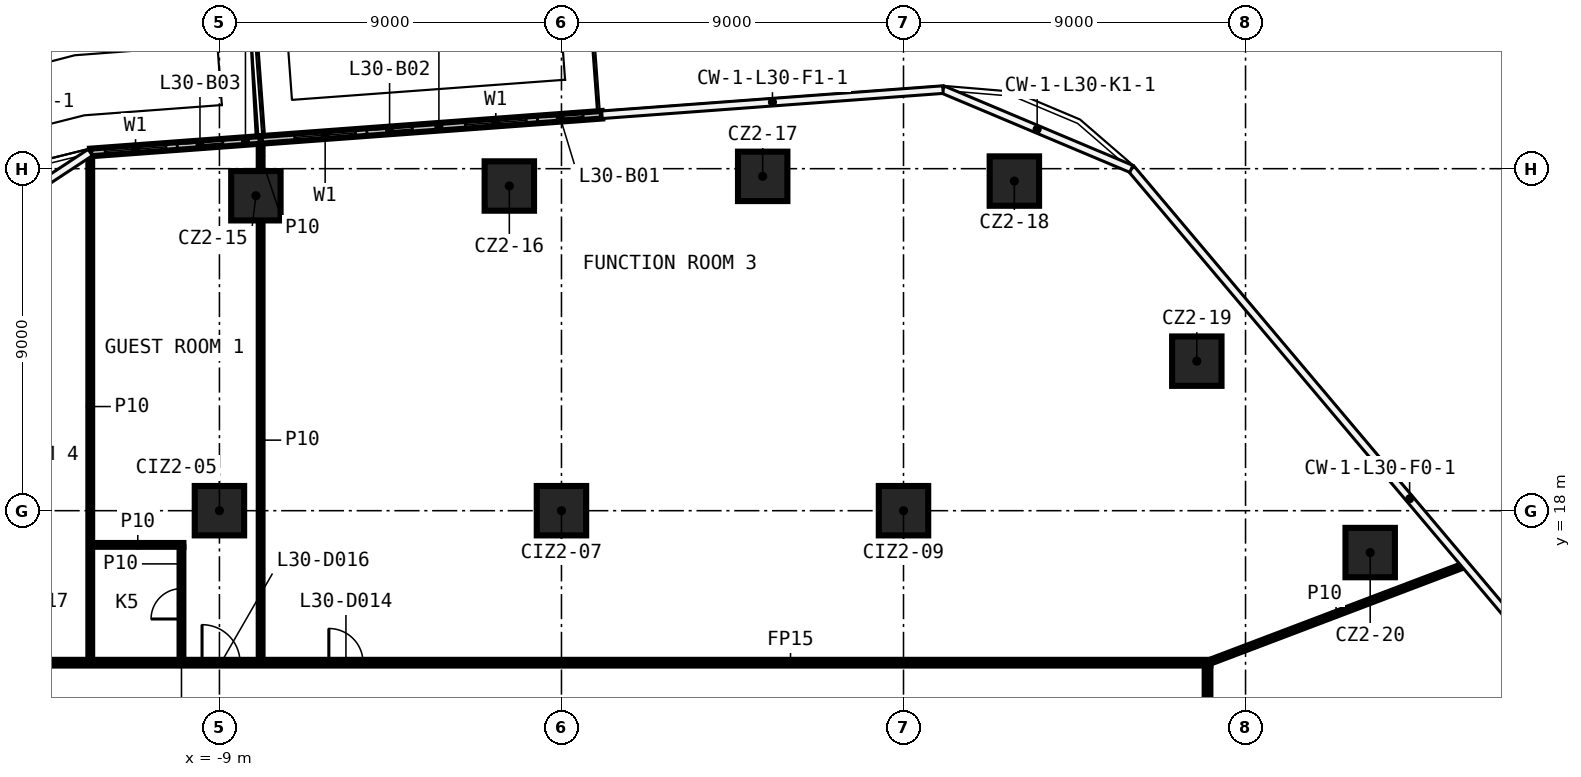
"""IFC4 building model, lengths in metres.
Left out: names, types, materials, properties, quantities, classifications, styles, units other than length and angle.
Written with IfcOpenShell. Run it as: python <this file> out.ifc"""

import sys

from ifc_helpers import new_model, si_unit, direction, frame, frame_2d, origin, origin_2d, place, context, subcontext, project, spatial, rectangle, extrude, element, fill, save


model = new_model("IFC4")
c1 = context("Model", 3, precision=1e-05, world=origin(), true_north=direction((0.0, 1.0)))
c2 = subcontext(c1, "Body", "Model", "MODEL_VIEW")
j1 = project(units=[si_unit("LENGTHUNIT", "METRE"), si_unit("PLANEANGLEUNIT", "RADIAN")], contexts=[c1])
p1 = place(None, origin())
s1 = spatial("IfcSite", under=j1, at=p1, CompositionType="ELEMENT")
p2 = place(p1, origin())
s2 = spatial("IfcBuilding", under=s1, at=p2, CompositionType="ELEMENT")
p3 = place(p2, frame((0.0, 0.0, 135.9)))
s3 = spatial("IfcBuildingStorey", under=s2, at=p3, CompositionType="ELEMENT", Elevation=135.9)
for number, where, z_axis, x_axis in (
    (1, (-8.041, 26.288, 0.0), (0.0, 0.0, 1.0), (1.0, 0.0, 0.0)),
    (2, (-1.372, 26.544, 0.0), (0.0, 0.0, 1.0), (1.0, 0.0, 0.0)),
    (3, (5.295, 26.798, 0.0), (0.0, 0.0, 1.0), (1.0, 0.0, 0.0)),
    (4, (11.917, 26.674, 0.0), (0.0, 0.0, 1.0), (1.0, 0.0, 0.0)),
    (5, (16.718, 21.935, 0.0), (0.0, 0.0, 1.0), (1.0, 0.0, 0.0)),
    (6, (21.28, 16.898, 0.0), (0.0, 0.0, 1.0), (1.0, 0.0, 0.0)),
    (7, (-9.0, 18.0, 0.0), (0.0, 0.0, 1.0), (1.0, 0.0, 0.0)),
    (8, (0.0, 18.0, 0.0), (0.0, 0.0, 1.0), (1.0, 0.0, 0.0)),
    (9, (9.0, 18.0, 0.0), (0.0, 0.0, 1.0), (1.0, 0.0, 0.0)),
):
    element("IfcColumn", number, at=place(p3, frame(where, z_axis=z_axis, x_axis=x_axis)), inside=s3, PredefinedType="COLUMN", context=c2, shape_type="SweptSolid", body=[
        extrude(rectangle(XDim=1.3, YDim=1.3, at=origin_2d()), origin(), (0.0, 0.0, 1.0), 3.3),
    ])
p4 = place(p3, frame((-17.075, 14.0, 0.0), z_axis=(0.0, 0.0, 1.0), x_axis=(1.0, 0.0, 0.0)))
e10 = element("IfcWall", 10, at=p4, inside=s3, PredefinedType="PARTITIONING", context=c2, shape_type="SweptSolid", body=[
    extrude(rectangle(XDim=34.15, YDim=0.15, at=frame_2d((17.075, 0.0))), origin(), (0.0, 0.0, 1.0), 3.3),
])
p5 = place(p4, frame((10.954, 0.0, 0.0)))
e11 = element("IfcOpeningElement", 11, at=p5, cuts=e10, PredefinedType="OPENING", context=c2, shape_type="SweptSolid", body=[
    extrude(rectangle(XDim=0.9, YDim=2.1, at=frame_2d((0.45, 1.05))), frame((0.0, 0.085, 0.0), z_axis=(0.0, -1.0, 0.0), x_axis=(1.0, 0.0, 0.0)), (0.0, 0.0, 1.0), 0.17),
])
p6 = place(p4, frame((7.617, 0.0, 0.0)))
e12 = element("IfcOpeningElement", 12, at=p6, cuts=e10, PredefinedType="OPENING", context=c2, shape_type="SweptSolid", body=[
    extrude(rectangle(XDim=1.0, YDim=2.1, at=frame_2d((0.5, 1.05))), frame((0.0, 0.085, 0.0), z_axis=(0.0, -1.0, 0.0), x_axis=(1.0, 0.0, 0.0)), (0.0, 0.0, 1.0), 0.17),
])
p7 = place(p4, frame((2.425, 0.0, 0.0)))
e13 = element("IfcOpeningElement", 13, at=p7, cuts=e10, PredefinedType="OPENING", context=c2, shape_type="SweptSolid", body=[
    extrude(rectangle(XDim=0.9, YDim=2.1, at=frame_2d((0.45, 1.05))), frame((0.0, 0.085, 0.0), z_axis=(0.0, -1.0, 0.0), x_axis=(1.0, 0.0, 0.0)), (0.0, 0.0, 1.0), 0.17),
])
p8 = place(p3, frame((-12.349, 17.1, 0.0), z_axis=(0.0, 0.0, 1.0), x_axis=(1.0, 0.0, 0.0)))
e14 = element("IfcWall", 14, at=p8, inside=s3, PredefinedType="PARTITIONING", context=c2, shape_type="SweptSolid", body=[
    extrude(rectangle(XDim=2.4, YDim=0.1, at=frame_2d((1.2, 0.0))), origin(), (0.0, 0.0, 1.0), 3.3),
])
p9 = place(p3, frame((17.0, 14.0, 0.0), z_axis=(0.0, 0.0, 1.0), x_axis=(0.934953139897, 0.354771230791, 0.0)))
e15 = element("IfcWall", 15, at=p9, inside=s3, PredefinedType="PARTITIONING", context=c2, shape_type="SweptSolid", body=[
    extrude(rectangle(XDim=7.234, YDim=0.1, at=frame_2d((3.617, 0.0))), origin(), (0.0, 0.0, 1.0), 3.3),
])
p10 = place(p3, frame((17.0, 13.925, 0.0), z_axis=(0.0, 0.0, 1.0), x_axis=(0.0, -1.0, 0.0)))
e16 = element("IfcWall", 16, at=p10, inside=s3, PredefinedType="PARTITIONING", context=c2, shape_type="SweptSolid", body=[
    extrude(rectangle(XDim=27.85, YDim=0.15, at=frame_2d((13.925, 0.0))), origin(), (0.0, 0.0, 1.0), 3.3),
])
p11 = place(p10, frame((24.983, 0.0, 0.0)))
e17 = element("IfcOpeningElement", 17, at=p11, cuts=e16, PredefinedType="OPENING", context=c2, shape_type="SweptSolid", body=[
    extrude(rectangle(XDim=0.9, YDim=2.1, at=frame_2d((0.45, 1.05))), frame((0.0, 0.085, 0.0), z_axis=(0.0, -1.0, 0.0), x_axis=(1.0, 0.0, 0.0)), (0.0, 0.0, 1.0), 0.17),
])
p12 = place(p10, frame((20.143, 0.0, 0.0)))
e18 = element("IfcOpeningElement", 18, at=p12, cuts=e16, PredefinedType="OPENING", context=c2, shape_type="SweptSolid", body=[
    extrude(rectangle(XDim=0.9, YDim=2.1, at=frame_2d((0.45, 1.05))), frame((0.0, 0.085, 0.0), z_axis=(0.0, -1.0, 0.0), x_axis=(1.0, 0.0, 0.0)), (0.0, 0.0, 1.0), 0.17),
])
p13 = place(p10, frame((11.054, 0.0, 0.0)))
e19 = element("IfcOpeningElement", 19, at=p13, cuts=e16, PredefinedType="OPENING", context=c2, shape_type="SweptSolid", body=[
    extrude(rectangle(XDim=1.0, YDim=2.1, at=frame_2d((0.5, 1.05))), frame((0.0, 0.085, 0.0), z_axis=(0.0, -1.0, 0.0), x_axis=(1.0, 0.0, 0.0)), (0.0, 0.0, 1.0), 0.17),
])
p14 = place(p10, frame((7.139, 0.0, 0.0)))
e20 = element("IfcOpeningElement", 20, at=p14, cuts=e16, PredefinedType="OPENING", context=c2, shape_type="SweptSolid", body=[
    extrude(rectangle(XDim=0.9, YDim=2.1, at=frame_2d((0.45, 1.05))), frame((0.0, 0.085, 0.0), z_axis=(0.0, -1.0, 0.0), x_axis=(1.0, 0.0, 0.0)), (0.0, 0.0, 1.0), 0.17),
])
p15 = place(p3, frame((-7.916, 14.075, 0.0), z_axis=(0.0, 0.0, 1.0), x_axis=(0.0, 1.0, 0.0)))
e21 = element("IfcWall", 21, at=p15, inside=s3, PredefinedType="PARTITIONING", context=c2, shape_type="SweptSolid", body=[
    extrude(rectangle(XDim=11.563, YDim=0.1, at=frame_2d((5.781, 0.0))), origin(), (0.0, 0.0, 1.0), 3.3),
])
p16 = place(p3, frame((-7.916, 26.938, 0.0), z_axis=(0.0, 0.0, 1.0), x_axis=(0.0, 1.0, 0.0)))
e22 = element("IfcWall", 22, at=p16, inside=s3, PredefinedType="PARTITIONING", context=c2, shape_type="SweptSolid", body=[
    extrude(rectangle(XDim=0.799, YDim=0.1, at=frame_2d((0.399, 0.0))), origin(), (0.0, 0.0, 1.0), 3.3),
])
p17 = place(p3, frame((-9.999, 14.075, 0.0), z_axis=(0.0, 0.0, 1.0), x_axis=(0.0, 1.0, 0.0)))
e23 = element("IfcWall", 23, at=p17, inside=s3, PredefinedType="PARTITIONING", context=c2, shape_type="SweptSolid", body=[
    extrude(rectangle(XDim=2.975, YDim=0.1, at=frame_2d((1.488, 0.0))), origin(), (0.0, 0.0, 1.0), 3.3),
])
p18 = place(p17, frame((1.075, 0.0, 0.0)))
e24 = element("IfcOpeningElement", 24, at=p18, cuts=e23, PredefinedType="OPENING", context=c2, shape_type="SweptSolid", body=[
    extrude(rectangle(XDim=0.8, YDim=2.1, at=frame_2d((0.4, 1.05))), frame((0.0, 0.06, 0.0), z_axis=(0.0, -1.0, 0.0), x_axis=(1.0, 0.0, 0.0)), (0.0, 0.0, 1.0), 0.12),
])
p19 = place(p3, frame((-12.399, 14.075, 0.0), z_axis=(0.0, 0.0, 1.0), x_axis=(0.0, 1.0, 0.0)))
e25 = element("IfcWall", 25, at=p19, inside=s3, PredefinedType="PARTITIONING", context=c2, shape_type="SweptSolid", body=[
    extrude(rectangle(XDim=13.331, YDim=0.1, at=frame_2d((6.666, 0.0))), origin(), (0.0, 0.0, 1.0), 3.3),
])
p20 = place(p3, frame((1.065, 28.419, 0.0), z_axis=(0.0, 0.0, 1.0), x_axis=(-0.997293582655, -0.07352217349, 0.0)))
e26 = element("IfcWall", 26, at=p20, inside=s3, PredefinedType="SOLIDWALL", context=c2, shape_type="SweptSolid", body=[
    extrude(rectangle(XDim=9.006, YDim=0.2, at=frame_2d((4.503, 0.0))), origin(), (0.0, 0.0, 1.0), 3.3),
])
p21 = place(p20, frame((2.0, 0.0, 0.6)))
e27 = element("IfcOpeningElement", 27, at=p21, cuts=e26, PredefinedType="OPENING", context=c2, shape_type="SweptSolid", body=[
    extrude(rectangle(XDim=1.6, YDim=2.4, at=frame_2d((0.8, 1.2))), frame((0.0, 0.11, 0.0), z_axis=(0.0, -1.0, 0.0), x_axis=(1.0, 0.0, 0.0)), (0.0, 0.0, 1.0), 0.22),
])
p22 = place(p20, frame((0.5, 0.0, 0.0)))
e28 = element("IfcOpeningElement", 28, at=p22, cuts=e26, PredefinedType="OPENING", context=c2, shape_type="SweptSolid", body=[
    extrude(rectangle(XDim=1.2, YDim=2.4, at=frame_2d((0.6, 1.2))), frame((0.0, 0.11, 0.0), z_axis=(0.0, -1.0, 0.0), x_axis=(1.0, 0.0, 0.0)), (0.0, 0.0, 1.0), 0.22),
])
p23 = place(p20, frame((6.503, 0.0, 0.6)))
e29 = element("IfcOpeningElement", 29, at=p23, cuts=e26, PredefinedType="OPENING", context=c2, shape_type="SweptSolid", body=[
    extrude(rectangle(XDim=1.6, YDim=2.4, at=frame_2d((0.8, 1.2))), frame((0.0, 0.11, 0.0), z_axis=(0.0, -1.0, 0.0), x_axis=(1.0, 0.0, 0.0)), (0.0, 0.0, 1.0), 0.22),
])
p24 = place(p20, frame((5.003, 0.0, 0.0)))
e30 = element("IfcOpeningElement", 30, at=p24, cuts=e26, PredefinedType="OPENING", context=c2, shape_type="SweptSolid", body=[
    extrude(rectangle(XDim=1.2, YDim=2.4, at=frame_2d((0.6, 1.2))), frame((0.0, 0.11, 0.0), z_axis=(0.0, -1.0, 0.0), x_axis=(1.0, 0.0, 0.0)), (0.0, 0.0, 1.0), 0.22),
])
p25 = place(p3, frame((-7.917, 27.757, 0.0), z_axis=(0.0, 0.0, 1.0), x_axis=(-0.997291417846, -0.073551532206, 0.0)))
e31 = element("IfcWall", 31, at=p25, inside=s3, PredefinedType="SOLIDWALL", context=c2, shape_type="SweptSolid", body=[
    extrude(rectangle(XDim=4.494, YDim=0.2, at=frame_2d((2.247, 0.0))), origin(), (0.0, 0.0, 1.0), 3.3),
])
p26 = place(p25, frame((2.5, 0.0, 0.6)))
e32 = element("IfcOpeningElement", 32, at=p26, cuts=e31, PredefinedType="OPENING", context=c2, shape_type="SweptSolid", body=[
    extrude(rectangle(XDim=1.6, YDim=2.4, at=frame_2d((0.8, 1.2))), frame((0.0, 0.11, 0.0), z_axis=(0.0, -1.0, 0.0), x_axis=(1.0, 0.0, 0.0)), (0.0, 0.0, 1.0), 0.22),
])
p27 = place(p25, frame((1.0, 0.0, 0.0)))
e33 = element("IfcOpeningElement", 33, at=p27, cuts=e31, PredefinedType="OPENING", context=c2, shape_type="SweptSolid", body=[
    extrude(rectangle(XDim=1.2, YDim=2.4, at=frame_2d((0.6, 1.2))), frame((0.0, 0.11, 0.0), z_axis=(0.0, -1.0, 0.0), x_axis=(1.0, 0.0, 0.0)), (0.0, 0.0, 1.0), 0.22),
])
p28 = place(p5, origin())
e34 = element("IfcDoor", 34, at=p28, inside=s3, OperationType="SINGLE_SWING_RIGHT", PredefinedType="DOOR", context=c2, shape_type="SweptSolid", body=[
    extrude(rectangle(XDim=0.9, YDim=2.1, at=frame_2d((0.45, 1.05))), frame((0.0, 0.025, 0.0), z_axis=(0.0, -1.0, 0.0), x_axis=(1.0, 0.0, 0.0)), (0.0, 0.0, 1.0), 0.05),
])
fill(e11, e34)
p29 = place(p18, origin())
e35 = element("IfcDoor", 35, at=p29, inside=s3, OperationType="SINGLE_SWING_RIGHT", PredefinedType="DOOR", context=c2, shape_type="SweptSolid", body=[
    extrude(rectangle(XDim=0.8, YDim=2.1, at=frame_2d((0.4, 1.05))), frame((0.0, 0.025, 0.0), z_axis=(0.0, -1.0, 0.0), x_axis=(1.0, 0.0, 0.0)), (0.0, 0.0, 1.0), 0.05),
])
fill(e24, e35)
p30 = place(p6, origin())
e36 = element("IfcDoor", 36, at=p30, inside=s3, OperationType="SINGLE_SWING_LEFT", PredefinedType="DOOR", context=c2, shape_type="SweptSolid", body=[
    extrude(rectangle(XDim=1.0, YDim=2.1, at=frame_2d((0.5, 1.05))), frame((0.0, 0.025, 0.0), z_axis=(0.0, -1.0, 0.0), x_axis=(1.0, 0.0, 0.0)), (0.0, 0.0, 1.0), 0.05),
])
fill(e12, e36)
p31 = place(p21, origin())
e37 = element("IfcWindow", 37, at=p31, inside=s3, PartitioningType="SINGLE_PANEL", PredefinedType="WINDOW", context=c2, shape_type="SweptSolid", body=[
    extrude(rectangle(XDim=1.6, YDim=2.4, at=frame_2d((0.8, 1.2))), frame((0.0, 0.03, 0.0), z_axis=(0.0, -1.0, 0.0), x_axis=(1.0, 0.0, 0.0)), (0.0, 0.0, 1.0), 0.06),
])
fill(e27, e37)
p32 = place(p22, origin())
e38 = element("IfcDoor", 38, at=p32, inside=s3, OperationType="SLIDING_TO_LEFT", PredefinedType="DOOR", context=c2, shape_type="SweptSolid", body=[
    extrude(rectangle(XDim=1.2, YDim=2.4, at=frame_2d((0.6, 1.2))), frame((0.0, 0.025, 0.0), z_axis=(0.0, -1.0, 0.0), x_axis=(1.0, 0.0, 0.0)), (0.0, 0.0, 1.0), 0.05),
])
fill(e28, e38)
p33 = place(p23, origin())
e39 = element("IfcWindow", 39, at=p33, inside=s3, PartitioningType="SINGLE_PANEL", PredefinedType="WINDOW", context=c2, shape_type="SweptSolid", body=[
    extrude(rectangle(XDim=1.6, YDim=2.4, at=frame_2d((0.8, 1.2))), frame((0.0, 0.03, 0.0), z_axis=(0.0, -1.0, 0.0), x_axis=(1.0, 0.0, 0.0)), (0.0, 0.0, 1.0), 0.06),
])
fill(e29, e39)
p34 = place(p24, origin())
e40 = element("IfcDoor", 40, at=p34, inside=s3, OperationType="SLIDING_TO_LEFT", PredefinedType="DOOR", context=c2, shape_type="SweptSolid", body=[
    extrude(rectangle(XDim=1.2, YDim=2.4, at=frame_2d((0.6, 1.2))), frame((0.0, 0.025, 0.0), z_axis=(0.0, -1.0, 0.0), x_axis=(1.0, 0.0, 0.0)), (0.0, 0.0, 1.0), 0.05),
])
fill(e30, e40)
p35 = place(p26, origin())
e41 = element("IfcWindow", 41, at=p35, inside=s3, PartitioningType="SINGLE_PANEL", PredefinedType="WINDOW", context=c2, shape_type="SweptSolid", body=[
    extrude(rectangle(XDim=1.6, YDim=2.4, at=frame_2d((0.8, 1.2))), frame((0.0, 0.03, 0.0), z_axis=(0.0, -1.0, 0.0), x_axis=(1.0, 0.0, 0.0)), (0.0, 0.0, 1.0), 0.06),
])
fill(e32, e41)
p36 = place(p27, origin())
e42 = element("IfcDoor", 42, at=p36, inside=s3, OperationType="SLIDING_TO_LEFT", PredefinedType="DOOR", context=c2, shape_type="SweptSolid", body=[
    extrude(rectangle(XDim=1.2, YDim=2.4, at=frame_2d((0.6, 1.2))), frame((0.0, 0.025, 0.0), z_axis=(0.0, -1.0, 0.0), x_axis=(1.0, 0.0, 0.0)), (0.0, 0.0, 1.0), 0.05),
])
fill(e33, e42)
save(model, sys.argv[1])
